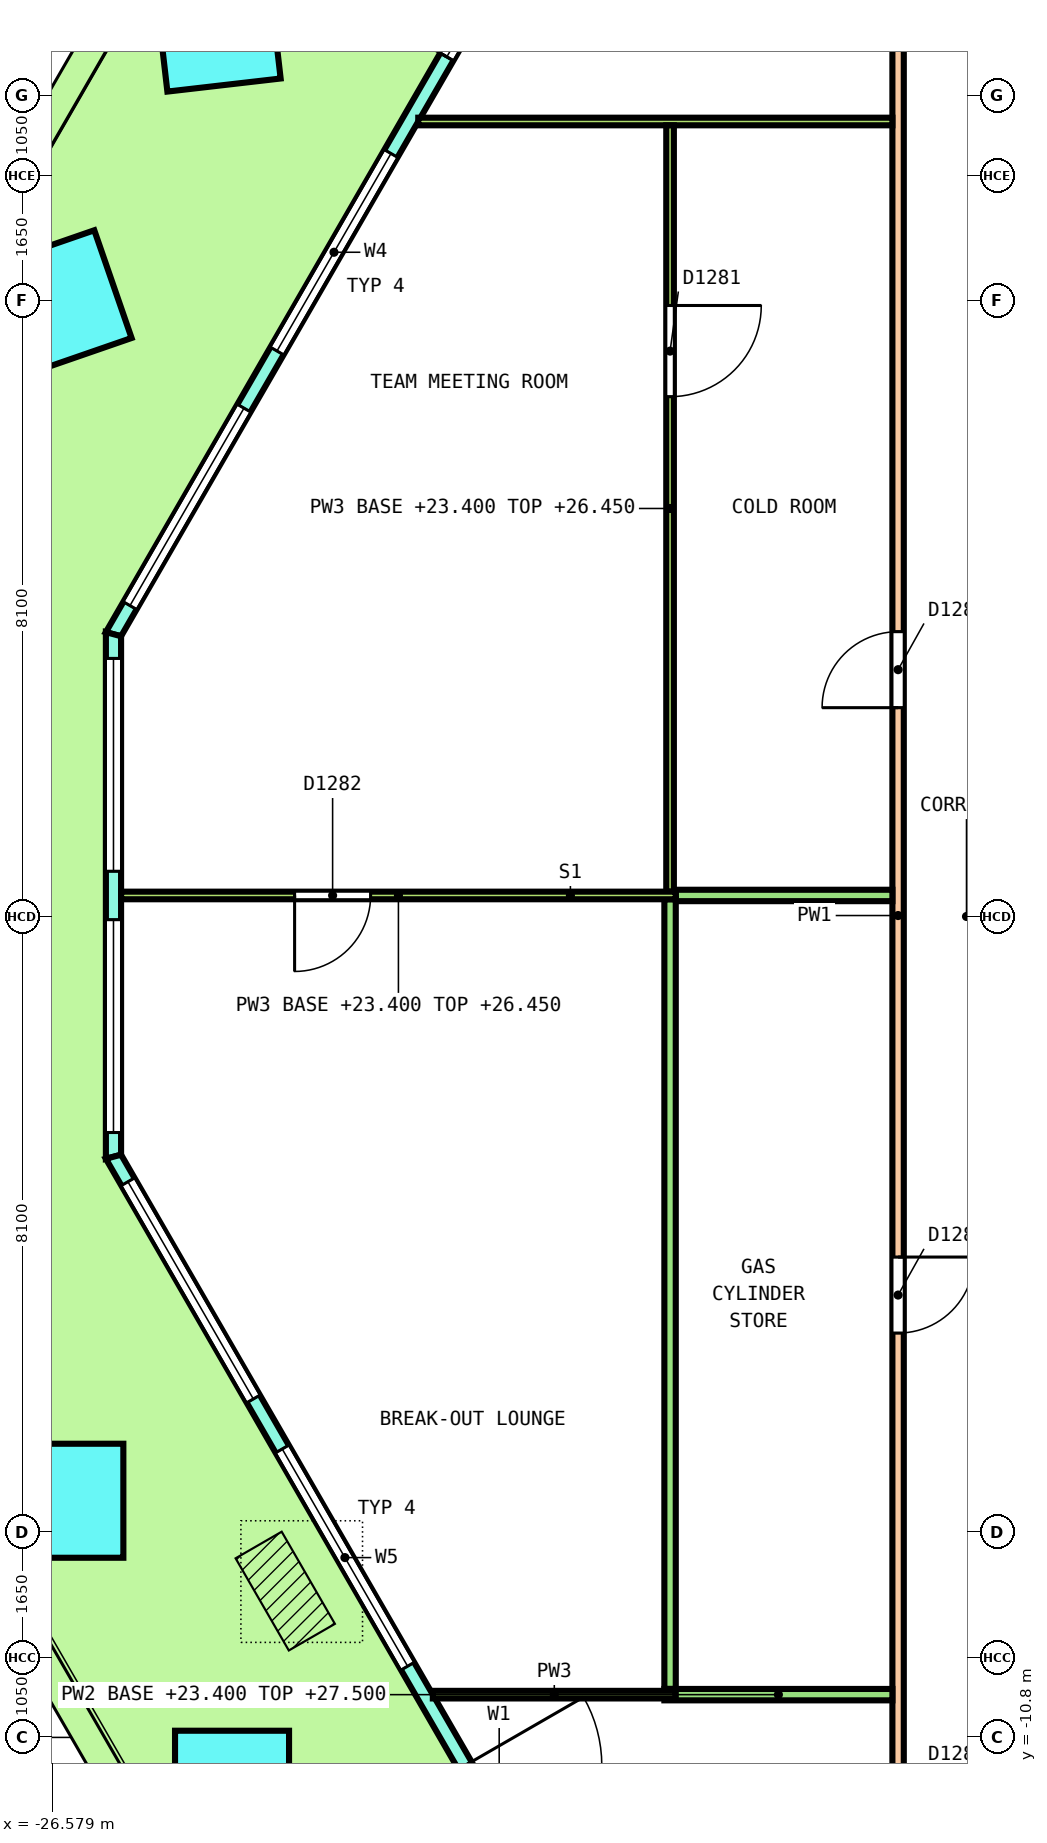
"""IFC4 building model, lengths in metres.
Left out: names, types, materials, properties, quantities, classifications, styles, units other than length and angle.
Written with IfcOpenShell. Run it as: python <this file> out.ifc"""

import sys

from ifc_helpers import new_model, si_unit, direction, frame, frame_2d, origin, origin_2d, place, context, subcontext, project, spatial, polyline, rectangle, outline, extrude, element, fill, save


model = new_model("IFC4")
c1 = context("Model", 3, precision=1e-05, world=origin(), true_north=direction((0.0, 1.0)))
c2 = subcontext(c1, "Body", "Model", "MODEL_VIEW")
j1 = project(units=[si_unit("LENGTHUNIT", "METRE"), si_unit("PLANEANGLEUNIT", "RADIAN")], contexts=[c1])
p1 = place(None, origin())
s1 = spatial("IfcSite", under=j1, at=p1, CompositionType="ELEMENT")
p2 = place(p1, origin())
s2 = spatial("IfcBuilding", under=s1, at=p2, CompositionType="ELEMENT")
p3 = place(p2, frame((0.0, 0.0, 23.4)))
s3 = spatial("IfcBuildingStorey", under=s2, at=p3, CompositionType="ELEMENT", Elevation=23.4)
p4 = place(p3, frame((-24.404, 11.683, 0.0), z_axis=(-0.025425794273, 0.018858468264, 0.999498817988), x_axis=(-0.499709914648, -0.866185208492, 0.003631224684)))
e1 = element("IfcColumn", 1, at=p4, inside=s3, PredefinedType="COLUMN", context=c2, shape_type="SweptSolid", body=[
    extrude(rectangle(XDim=1.5, YDim=1.5, at=origin_2d()), origin(), (0.0, 0.0, 1.0), 4.052),
])
p5 = place(p3, frame((-26.488, 8.074, 0.0), z_axis=(-0.021809609218, 0.025123223878, 0.999446429063), x_axis=(-0.499316957517, -0.86635106376, 0.010881647777)))
e2 = element("IfcColumn", 2, at=p5, inside=s3, PredefinedType="COLUMN", context=c2, shape_type="SweptSolid", body=[
    extrude(rectangle(XDim=1.5, YDim=1.5, at=origin_2d()), origin(), (0.0, 0.0, 1.0), 4.052),
])
p6 = place(p3, frame((-26.393, -7.687, 0.0), z_axis=(-0.010908253887, 0.018863444567, 0.99976256204), x_axis=(0.500638377412, -0.865382225109, 0.021790354016)))
e3 = element("IfcColumn", 3, at=p6, inside=s3, PredefinedType="COLUMN", context=c2, shape_type="SweptSolid", body=[
    extrude(rectangle(XDim=1.5, YDim=1.5, at=origin_2d()), origin(), (0.0, 0.0, 1.0), 4.051),
])
p7 = place(p3, frame((-24.213, -11.462, 0.0), z_axis=(-0.003616759812, 0.006269050341, 0.999973808685), x_axis=(0.499535500447, -0.866263182786, 0.007237536985)))
e4 = element("IfcColumn", 4, at=p7, inside=s3, PredefinedType="COLUMN", context=c2, shape_type="SweptSolid", body=[
    extrude(rectangle(XDim=1.5, YDim=1.5, at=origin_2d()), origin(), (0.0, 0.0, 1.0), 4.05),
])
p8 = place(p3, frame((-16.103, 20.463, 0.0), z_axis=(0.0, 0.0, 1.0), x_axis=(-0.500000373815, -0.866025187962, 0.0)))
e5 = element("IfcWall", 5, at=p8, inside=s3, PredefinedType="SOLIDWALL", context=c2, shape_type="SweptSolid", body=[
    extrude(outline(polyline([(-0.027, -0.1), (0.994, -0.1), (2.015, -0.1), (3.035, -0.1), (4.056, -0.1), (5.077, -0.1), (6.097, -0.1), (7.118, -0.1), (8.139, -0.1), (9.16, -0.1), (10.18, -0.1), (11.201, -0.1), (12.222, -0.1), (13.242, -0.1), (14.263, -0.1), (15.284, -0.1), (16.304, -0.1), (17.325, -0.1), (18.346, -0.1), (19.367, -0.1), (19.313, 0.1), (18.298, 0.1), (17.283, 0.1), (16.268, 0.1), (15.253, 0.1), (14.238, 0.1), (13.223, 0.1), (12.208, 0.1), (11.193, 0.1), (10.177, 0.1), (9.162, 0.1), (8.147, 0.1), (7.132, 0.1), (6.117, 0.1), (5.102, 0.1), (4.087, 0.1), (3.072, 0.1), (2.057, 0.1), (1.042, 0.1), (0.027, 0.1), (-0.027, -0.1)])), origin(), (0.0, 0.0, 1.0), 4.1),
])
p9 = place(p8, frame((0.434, 0.0, 0.1)))
e6 = element("IfcOpeningElement", 6, at=p9, cuts=e5, PredefinedType="OPENING", context=c2, shape_type="SweptSolid", body=[
    extrude(rectangle(XDim=3.0, YDim=2.9, at=frame_2d((1.5, 1.45))), frame((0.0, 0.11, 0.0), z_axis=(0.0, -1.0, 0.0), x_axis=(1.0, 0.0, 0.0)), (0.0, 0.0, 1.0), 0.22),
])
p10 = place(p8, frame((4.302, 0.0, 0.1)))
e7 = element("IfcOpeningElement", 7, at=p10, cuts=e5, PredefinedType="OPENING", context=c2, shape_type="SweptSolid", body=[
    extrude(rectangle(XDim=3.0, YDim=2.9, at=frame_2d((1.5, 1.45))), frame((0.0, 0.11, 0.0), z_axis=(0.0, -1.0, 0.0), x_axis=(1.0, 0.0, 0.0)), (0.0, 0.0, 1.0), 0.22),
])
p11 = place(p8, frame((8.77, 0.0, 0.0)))
e8 = element("IfcOpeningElement", 8, at=p11, cuts=e5, PredefinedType="OPENING", context=c2, shape_type="SweptSolid", body=[
    extrude(rectangle(XDim=1.8, YDim=2.4, at=frame_2d((0.9, 1.2))), frame((0.0, 0.11, 0.0), z_axis=(0.0, -1.0, 0.0), x_axis=(1.0, 0.0, 0.0)), (0.0, 0.0, 1.0), 0.22),
])
p12 = place(p8, frame((8.77, 0.0, 2.55)))
e9 = element("IfcOpeningElement", 9, at=p12, cuts=e5, PredefinedType="OPENING", context=c2, shape_type="SweptSolid", body=[
    extrude(rectangle(XDim=1.8, YDim=0.45, at=frame_2d((0.9, 0.225))), frame((0.0, 0.11, 0.0), z_axis=(0.0, -1.0, 0.0), x_axis=(1.0, 0.0, 0.0)), (0.0, 0.0, 1.0), 0.22),
])
p13 = place(p8, frame((12.038, 0.0, 0.1)))
e10 = element("IfcOpeningElement", 10, at=p13, cuts=e5, PredefinedType="OPENING", context=c2, shape_type="SweptSolid", body=[
    extrude(rectangle(XDim=3.0, YDim=2.9, at=frame_2d((1.5, 1.45))), frame((0.0, 0.11, 0.0), z_axis=(0.0, -1.0, 0.0), x_axis=(1.0, 0.0, 0.0)), (0.0, 0.0, 1.0), 0.22),
])
p14 = place(p8, frame((15.906, 0.0, 0.1)))
e11 = element("IfcOpeningElement", 11, at=p14, cuts=e5, PredefinedType="OPENING", context=c2, shape_type="SweptSolid", body=[
    extrude(rectangle(XDim=3.0, YDim=2.9, at=frame_2d((1.5, 1.45))), frame((0.0, 0.11, 0.0), z_axis=(0.0, -1.0, 0.0), x_axis=(1.0, 0.0, 0.0)), (0.0, 0.0, 1.0), 0.22),
])
p15 = place(p3, frame((-25.772, 3.714, 0.0), z_axis=(0.0, 0.0, 1.0), x_axis=(0.0, -1.0, 0.0)))
e12 = element("IfcWall", 12, at=p15, inside=s3, PredefinedType="SOLIDWALL", context=c2, shape_type="SweptSolid", body=[
    extrude(outline(polyline([(-0.027, -0.1), (1.128, -0.1), (2.283, -0.1), (3.438, -0.1), (4.592, -0.1), (5.747, -0.1), (6.902, -0.1), (6.848, 0.1), (5.711, 0.1), (4.574, 0.1), (3.438, 0.1), (2.301, 0.1), (1.164, 0.1), (0.027, 0.1), (-0.027, -0.1)])), origin(), (0.0, 0.0, 1.0), 4.1),
])
p16 = place(p15, frame((0.319, 0.0, 0.1)))
e13 = element("IfcOpeningElement", 13, at=p16, cuts=e12, PredefinedType="OPENING", context=c2, shape_type="SweptSolid", body=[
    extrude(rectangle(XDim=2.8, YDim=2.9, at=frame_2d((1.4, 1.45))), frame((0.0, 0.11, 0.0), z_axis=(0.0, -1.0, 0.0), x_axis=(1.0, 0.0, 0.0)), (0.0, 0.0, 1.0), 0.22),
])
p17 = place(p15, frame((3.756, 0.0, 0.1)))
e14 = element("IfcOpeningElement", 14, at=p17, cuts=e12, PredefinedType="OPENING", context=c2, shape_type="SweptSolid", body=[
    extrude(rectangle(XDim=2.8, YDim=2.9, at=frame_2d((1.4, 1.45))), frame((0.0, 0.11, 0.0), z_axis=(0.0, -1.0, 0.0), x_axis=(1.0, 0.0, 0.0)), (0.0, 0.0, 1.0), 0.22),
])
p18 = place(p3, frame((-25.772, -3.161, 0.0), z_axis=(0.0, 0.0, 1.0), x_axis=(0.500001833672, -0.866024345111, 0.0)))
e15 = element("IfcWall", 15, at=p18, inside=s3, PredefinedType="SOLIDWALL", context=c2, shape_type="SweptSolid", body=[
    extrude(outline(polyline([(-0.027, -0.1), (0.991, -0.1), (2.008, -0.1), (3.026, -0.1), (4.043, -0.1), (5.061, -0.1), (6.079, -0.1), (7.096, -0.1), (8.114, -0.1), (9.131, -0.1), (10.149, -0.1), (11.167, -0.1), (12.184, -0.1), (13.202, -0.1), (14.219, -0.1), (15.237, -0.1), (16.254, -0.1), (17.272, -0.1), (18.29, -0.1), (19.307, -0.1), (20.325, -0.1), (20.271, 0.1), (19.259, 0.1), (18.247, 0.1), (17.234, 0.1), (16.222, 0.1), (15.21, 0.1), (14.198, 0.1), (13.186, 0.1), (12.173, 0.1), (11.161, 0.1), (10.149, 0.1), (9.137, 0.1), (8.125, 0.1), (7.112, 0.1), (6.1, 0.1), (5.088, 0.1), (4.076, 0.1), (3.063, 0.1), (2.051, 0.1), (1.039, 0.1), (0.027, 0.1), (-0.027, -0.1)])), origin(), (0.0, 0.0, 1.0), 4.1),
])
p19 = place(p18, frame((0.38, 0.0, 0.1)))
e16 = element("IfcOpeningElement", 16, at=p19, cuts=e15, PredefinedType="OPENING", context=c2, shape_type="SweptSolid", body=[
    extrude(rectangle(XDim=3.3, YDim=2.9, at=frame_2d((1.65, 1.45))), frame((0.0, 0.11, 0.0), z_axis=(0.0, -1.0, 0.0), x_axis=(1.0, 0.0, 0.0)), (0.0, 0.0, 1.0), 0.22),
])
p20 = place(p18, frame((4.439, 0.0, 0.1)))
e17 = element("IfcOpeningElement", 17, at=p20, cuts=e15, PredefinedType="OPENING", context=c2, shape_type="SweptSolid", body=[
    extrude(rectangle(XDim=3.3, YDim=2.9, at=frame_2d((1.65, 1.45))), frame((0.0, 0.11, 0.0), z_axis=(0.0, -1.0, 0.0), x_axis=(1.0, 0.0, 0.0)), (0.0, 0.0, 1.0), 0.22),
])
p21 = place(p18, frame((9.249, 0.0, 0.0)))
e18 = element("IfcOpeningElement", 18, at=p21, cuts=e15, PredefinedType="OPENING", context=c2, shape_type="SweptSolid", body=[
    extrude(rectangle(XDim=1.8, YDim=2.4, at=frame_2d((0.9, 1.2))), frame((0.0, 0.11, 0.0), z_axis=(0.0, -1.0, 0.0), x_axis=(1.0, 0.0, 0.0)), (0.0, 0.0, 1.0), 0.22),
])
p22 = place(p18, frame((9.249, 0.0, 2.55)))
e19 = element("IfcOpeningElement", 19, at=p22, cuts=e15, PredefinedType="OPENING", context=c2, shape_type="SweptSolid", body=[
    extrude(rectangle(XDim=1.8, YDim=0.45, at=frame_2d((0.9, 0.225))), frame((0.0, 0.11, 0.0), z_axis=(0.0, -1.0, 0.0), x_axis=(1.0, 0.0, 0.0)), (0.0, 0.0, 1.0), 0.22),
])
p23 = place(p18, frame((12.559, 0.0, 0.1)))
e20 = element("IfcOpeningElement", 20, at=p23, cuts=e15, PredefinedType="OPENING", context=c2, shape_type="SweptSolid", body=[
    extrude(rectangle(XDim=3.3, YDim=2.9, at=frame_2d((1.65, 1.45))), frame((0.0, 0.11, 0.0), z_axis=(0.0, -1.0, 0.0), x_axis=(1.0, 0.0, 0.0)), (0.0, 0.0, 1.0), 0.22),
])
p24 = place(p18, frame((16.618, 0.0, 0.1)))
e21 = element("IfcOpeningElement", 21, at=p24, cuts=e15, PredefinedType="OPENING", context=c2, shape_type="SweptSolid", body=[
    extrude(rectangle(XDim=3.3, YDim=2.9, at=frame_2d((1.65, 1.45))), frame((0.0, 0.11, 0.0), z_axis=(0.0, -1.0, 0.0), x_axis=(1.0, 0.0, 0.0)), (0.0, 0.0, 1.0), 0.22),
])
p25 = place(p3, frame((-15.45, -12.975, 0.0), z_axis=(0.0, 0.0, 1.0), x_axis=(0.0, 1.0, 0.0)))
e22 = element("IfcWall", 22, at=p25, inside=s3, PredefinedType="PARTITIONING", context=c2, shape_type="SweptSolid", body=[
    extrude(rectangle(XDim=25.975, YDim=0.15, at=frame_2d((12.988, 0.0))), origin(), (0.0, 0.0, 1.0), 3.05),
])
p26 = place(p25, frame((24.452, 0.0, 0.0)))
e23 = element("IfcOpeningElement", 23, at=p26, cuts=e22, PredefinedType="OPENING", context=c2, shape_type="SweptSolid", body=[
    extrude(rectangle(XDim=1.0, YDim=2.1, at=frame_2d((0.5, 1.05))), frame((0.0, 0.085, 0.0), z_axis=(0.0, -1.0, 0.0), x_axis=(1.0, 0.0, 0.0)), (0.0, 0.0, 1.0), 0.17),
])
p27 = place(p25, frame((15.722, 0.0, 0.0)))
e24 = element("IfcOpeningElement", 24, at=p27, cuts=e22, PredefinedType="OPENING", context=c2, shape_type="SweptSolid", body=[
    extrude(rectangle(XDim=1.0, YDim=2.1, at=frame_2d((0.5, 1.05))), frame((0.0, 0.085, 0.0), z_axis=(0.0, -1.0, 0.0), x_axis=(1.0, 0.0, 0.0)), (0.0, 0.0, 1.0), 0.17),
])
p28 = place(p25, frame((7.494, 0.0, 0.0)))
e25 = element("IfcOpeningElement", 25, at=p28, cuts=e22, PredefinedType="OPENING", context=c2, shape_type="SweptSolid", body=[
    extrude(rectangle(XDim=1.0, YDim=2.1, at=frame_2d((0.5, 1.05))), frame((0.0, 0.085, 0.0), z_axis=(0.0, -1.0, 0.0), x_axis=(1.0, 0.0, 0.0)), (0.0, 0.0, 1.0), 0.17),
])
p29 = place(p25, frame((0.664, 0.0, 0.0)))
e26 = element("IfcOpeningElement", 26, at=p29, cuts=e22, PredefinedType="OPENING", context=c2, shape_type="SweptSolid", body=[
    extrude(rectangle(XDim=1.0, YDim=2.1, at=frame_2d((0.5, 1.05))), frame((0.0, 0.085, 0.0), z_axis=(0.0, -1.0, 0.0), x_axis=(1.0, 0.0, 0.0)), (0.0, 0.0, 1.0), 0.17),
])
p30 = place(p3, frame((-18.375, 0.277, 0.0), z_axis=(0.0, 0.0, 1.0), x_axis=(1.0, 0.0, 0.0)))
e27 = element("IfcWall", 27, at=p30, inside=s3, PredefinedType="PARTITIONING", context=c2, shape_type="SweptSolid", body=[
    extrude(rectangle(XDim=2.85, YDim=0.15, at=frame_2d((1.425, 0.0))), origin(), (0.0, 0.0, 1.0), 3.05),
])
p31 = place(p3, frame((-18.45, -10.163, 0.0), z_axis=(0.0, 0.0, 1.0), x_axis=(0.0, 1.0, 0.0)))
e28 = element("IfcWall", 28, at=p31, inside=s3, PredefinedType="PARTITIONING", context=c2, shape_type="SweptSolid", body=[
    extrude(rectangle(XDim=10.389, YDim=0.15, at=frame_2d((5.195, 0.0))), origin(), (0.0, 0.0, 1.0), 3.05),
])
p32 = place(p3, frame((-18.525, -10.238, 0.0), z_axis=(0.0, 0.0, 1.0), x_axis=(1.0, 0.0, 0.0)))
e29 = element("IfcWall", 29, at=p32, inside=s3, PredefinedType="PARTITIONING", context=c2, shape_type="SweptSolid", body=[
    extrude(rectangle(XDim=3.0, YDim=0.15, at=frame_2d((1.5, 0.0))), origin(), (0.0, 0.0, 1.0), 4.1),
])
p33 = place(p3, frame((-21.763, 10.459, 0.0), z_axis=(0.0, 0.0, 1.0), x_axis=(1.0, 0.0, 0.0)))
e30 = element("IfcWall", 30, at=p33, inside=s3, PredefinedType="PARTITIONING", context=c2, shape_type="SweptSolid", body=[
    extrude(rectangle(XDim=6.238, YDim=0.1, at=frame_2d((3.119, 0.0))), origin(), (0.0, 0.0, 1.0), 3.05),
])
p34 = place(p3, frame((-18.45, 0.327, 0.0), z_axis=(0.0, 0.0, 1.0), x_axis=(0.0, 1.0, 0.0)))
e31 = element("IfcWall", 31, at=p34, inside=s3, PredefinedType="PARTITIONING", context=c2, shape_type="SweptSolid", body=[
    extrude(rectangle(XDim=10.082, YDim=0.1, at=frame_2d((5.041, 0.0))), origin(), (0.0, 0.0, 1.0), 3.05),
])
p35 = place(p34, frame((6.512, 0.0, 0.0)))
e32 = element("IfcOpeningElement", 32, at=p35, cuts=e31, PredefinedType="OPENING", context=c2, shape_type="SweptSolid", body=[
    extrude(rectangle(XDim=1.2, YDim=2.1, at=frame_2d((0.6, 1.05))), frame((0.0, 0.06, 0.0), z_axis=(0.0, -1.0, 0.0), x_axis=(1.0, 0.0, 0.0)), (0.0, 0.0, 1.0), 0.12),
])
p36 = place(p3, frame((-25.673, 0.277, 0.0), z_axis=(0.0, 0.0, 1.0), x_axis=(1.0, 0.0, 0.0)))
e33 = element("IfcWall", 33, at=p36, inside=s3, PredefinedType="PARTITIONING", context=c2, shape_type="SweptSolid", body=[
    extrude(rectangle(XDim=7.298, YDim=0.1, at=frame_2d((3.649, 0.0))), origin(), (0.0, 0.0, 1.0), 3.05),
])
p37 = place(p36, frame((2.283, 0.0, 0.0)))
e34 = element("IfcOpeningElement", 34, at=p37, cuts=e33, PredefinedType="OPENING", context=c2, shape_type="SweptSolid", body=[
    extrude(rectangle(XDim=1.0, YDim=2.1, at=frame_2d((0.5, 1.05))), frame((0.0, 0.06, 0.0), z_axis=(0.0, -1.0, 0.0), x_axis=(1.0, 0.0, 0.0)), (0.0, 0.0, 1.0), 0.12),
])
p38 = place(p3, frame((-21.571, -10.238, 0.0), z_axis=(0.0, 0.0, 1.0), x_axis=(1.0, 0.0, 0.0)))
e35 = element("IfcWall", 35, at=p38, inside=s3, PredefinedType="PARTITIONING", context=c2, shape_type="SweptSolid", body=[
    extrude(rectangle(XDim=3.196, YDim=0.1, at=frame_2d((1.598, 0.0))), origin(), (0.0, 0.0, 1.0), 3.05),
])
p39 = place(p11, origin())
e36 = element("IfcDoor", 36, at=p39, inside=s3, OperationType="DOUBLE_DOOR_SINGLE_SWING", PredefinedType="DOOR", context=c2, shape_type="SweptSolid", body=[
    extrude(rectangle(XDim=1.8, YDim=2.4, at=frame_2d((0.9, 1.2))), frame((0.0, 0.025, 0.0), z_axis=(0.0, -1.0, 0.0), x_axis=(1.0, 0.0, 0.0)), (0.0, 0.0, 1.0), 0.05),
])
fill(e8, e36)
p40 = place(p12, origin())
e37 = element("IfcWindow", 37, at=p40, inside=s3, PartitioningType="SINGLE_PANEL", PredefinedType="WINDOW", context=c2, shape_type="SweptSolid", body=[
    extrude(rectangle(XDim=1.8, YDim=0.45, at=frame_2d((0.9, 0.225))), frame((0.0, 0.03, 0.0), z_axis=(0.0, -1.0, 0.0), x_axis=(1.0, 0.0, 0.0)), (0.0, 0.0, 1.0), 0.06),
])
fill(e9, e37)
p41 = place(p13, origin())
e38 = element("IfcWindow", 38, at=p41, inside=s3, PartitioningType="SINGLE_PANEL", PredefinedType="WINDOW", context=c2, shape_type="SweptSolid", body=[
    extrude(rectangle(XDim=3.0, YDim=2.9, at=frame_2d((1.5, 1.45))), frame((0.0, 0.03, 0.0), z_axis=(0.0, -1.0, 0.0), x_axis=(1.0, 0.0, 0.0)), (0.0, 0.0, 1.0), 0.06),
])
fill(e10, e38)
p42 = place(p14, origin())
e39 = element("IfcWindow", 39, at=p42, inside=s3, PartitioningType="SINGLE_PANEL", PredefinedType="WINDOW", context=c2, shape_type="SweptSolid", body=[
    extrude(rectangle(XDim=3.0, YDim=2.9, at=frame_2d((1.5, 1.45))), frame((0.0, 0.03, 0.0), z_axis=(0.0, -1.0, 0.0), x_axis=(1.0, 0.0, 0.0)), (0.0, 0.0, 1.0), 0.06),
])
fill(e11, e39)
p43 = place(p16, origin())
e40 = element("IfcWindow", 40, at=p43, inside=s3, PartitioningType="SINGLE_PANEL", PredefinedType="WINDOW", context=c2, shape_type="SweptSolid", body=[
    extrude(rectangle(XDim=2.8, YDim=2.9, at=frame_2d((1.4, 1.45))), frame((0.0, 0.03, 0.0), z_axis=(0.0, -1.0, 0.0), x_axis=(1.0, 0.0, 0.0)), (0.0, 0.0, 1.0), 0.06),
])
fill(e13, e40)
p44 = place(p17, origin())
e41 = element("IfcWindow", 41, at=p44, inside=s3, PartitioningType="SINGLE_PANEL", PredefinedType="WINDOW", context=c2, shape_type="SweptSolid", body=[
    extrude(rectangle(XDim=2.8, YDim=2.9, at=frame_2d((1.4, 1.45))), frame((0.0, 0.03, 0.0), z_axis=(0.0, -1.0, 0.0), x_axis=(1.0, 0.0, 0.0)), (0.0, 0.0, 1.0), 0.06),
])
fill(e14, e41)
p45 = place(p19, origin())
e42 = element("IfcWindow", 42, at=p45, inside=s3, PartitioningType="SINGLE_PANEL", PredefinedType="WINDOW", context=c2, shape_type="SweptSolid", body=[
    extrude(rectangle(XDim=3.3, YDim=2.9, at=frame_2d((1.65, 1.45))), frame((0.0, 0.03, 0.0), z_axis=(0.0, -1.0, 0.0), x_axis=(1.0, 0.0, 0.0)), (0.0, 0.0, 1.0), 0.06),
])
fill(e16, e42)
p46 = place(p20, origin())
e43 = element("IfcWindow", 43, at=p46, inside=s3, PartitioningType="SINGLE_PANEL", PredefinedType="WINDOW", context=c2, shape_type="SweptSolid", body=[
    extrude(rectangle(XDim=3.3, YDim=2.9, at=frame_2d((1.65, 1.45))), frame((0.0, 0.03, 0.0), z_axis=(0.0, -1.0, 0.0), x_axis=(1.0, 0.0, 0.0)), (0.0, 0.0, 1.0), 0.06),
])
fill(e17, e43)
p47 = place(p27, origin())
e44 = element("IfcDoor", 44, at=p47, inside=s3, OperationType="SINGLE_SWING_LEFT", PredefinedType="DOOR", context=c2, shape_type="SweptSolid", body=[
    extrude(rectangle(XDim=1.0, YDim=2.1, at=frame_2d((0.5, 1.05))), frame((0.0, 0.025, 0.0), z_axis=(0.0, -1.0, 0.0), x_axis=(1.0, 0.0, 0.0)), (0.0, 0.0, 1.0), 0.05),
])
fill(e24, e44)
p48 = place(p35, origin())
e45 = element("IfcDoor", 45, at=p48, inside=s3, OperationType="DOUBLE_DOOR_SINGLE_SWING", PredefinedType="DOOR", context=c2, shape_type="SweptSolid", body=[
    extrude(rectangle(XDim=1.2, YDim=2.1, at=frame_2d((0.6, 1.05))), frame((0.0, 0.025, 0.0), z_axis=(0.0, -1.0, 0.0), x_axis=(1.0, 0.0, 0.0)), (0.0, 0.0, 1.0), 0.05),
])
fill(e32, e45)
p49 = place(p37, origin())
e46 = element("IfcDoor", 46, at=p49, inside=s3, OperationType="SINGLE_SWING_RIGHT", PredefinedType="DOOR", context=c2, shape_type="SweptSolid", body=[
    extrude(rectangle(XDim=1.0, YDim=2.1, at=frame_2d((0.5, 1.05))), frame((0.0, 0.025, 0.0), z_axis=(0.0, -1.0, 0.0), x_axis=(1.0, 0.0, 0.0)), (0.0, 0.0, 1.0), 0.05),
])
fill(e34, e46)
p50 = place(p28, origin())
e47 = element("IfcDoor", 47, at=p50, inside=s3, OperationType="SINGLE_SWING_RIGHT", PredefinedType="DOOR", context=c2, shape_type="SweptSolid", body=[
    extrude(rectangle(XDim=1.0, YDim=2.1, at=frame_2d((0.5, 1.05))), frame((0.0, 0.025, 0.0), z_axis=(0.0, -1.0, 0.0), x_axis=(1.0, 0.0, 0.0)), (0.0, 0.0, 1.0), 0.05),
])
fill(e25, e47)
save(model, sys.argv[1])
